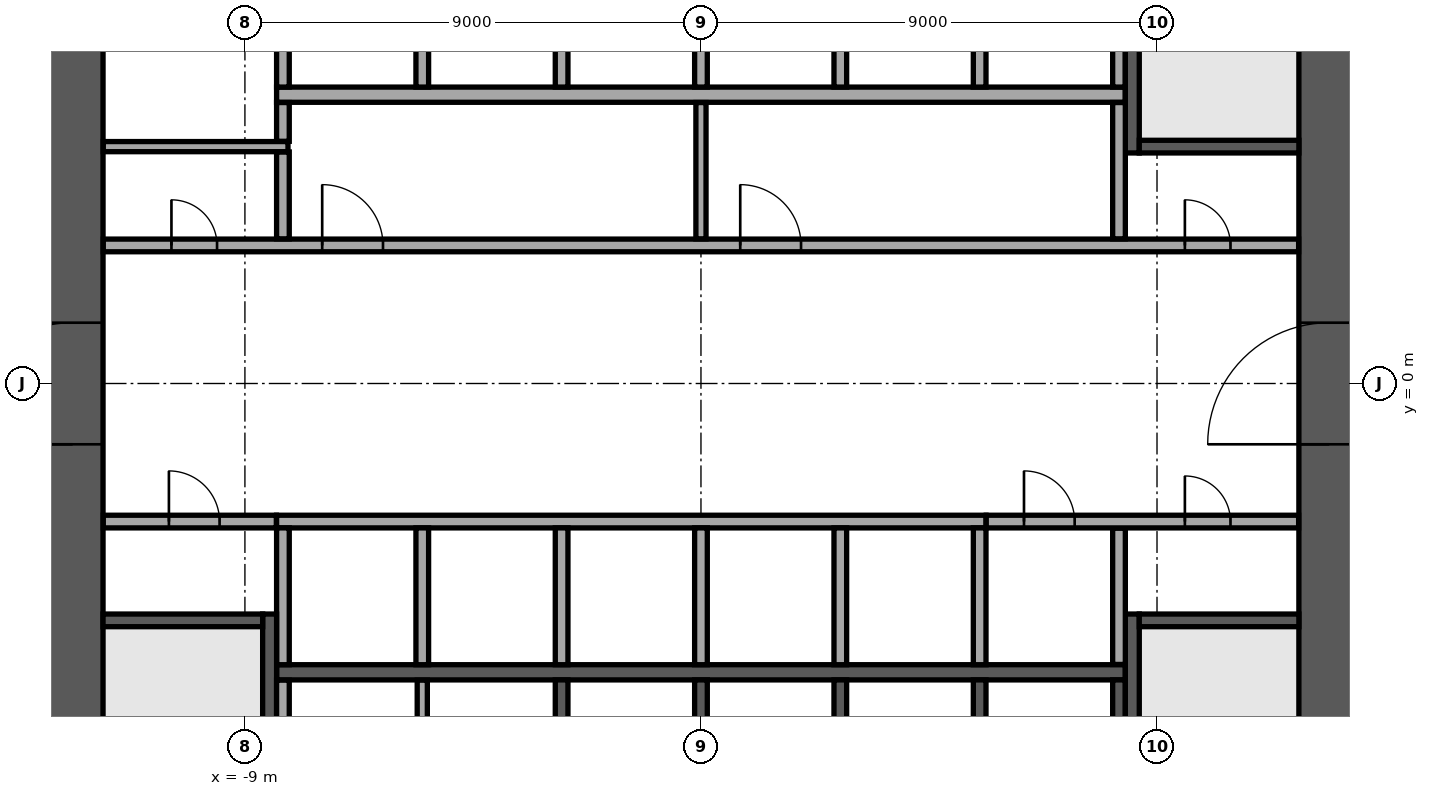
"""IFC4 building model, lengths in metres.
Left out: names, types, materials, properties, quantities, classifications, styles, units other than length and angle.
Written with IfcOpenShell. Run it as: python <this file> out.ifc"""

import sys

from ifc_helpers import new_model, si_unit, direction, frame, frame_2d, origin, place, context, subcontext, project, spatial, rectangle, extrude, element, fill, save


model = new_model("IFC4")
c1 = context("Model", 3, precision=1e-05, world=origin(), true_north=direction((0.0, 1.0)))
c2 = subcontext(c1, "Body", "Model", "MODEL_VIEW")
j1 = project(units=[si_unit("LENGTHUNIT", "METRE"), si_unit("PLANEANGLEUNIT", "RADIAN")], contexts=[c1])
p1 = place(None, origin())
s1 = spatial("IfcSite", under=j1, at=p1, CompositionType="ELEMENT")
p2 = place(p1, origin())
s2 = spatial("IfcBuilding", under=s1, at=p2, CompositionType="ELEMENT")
p3 = place(p2, frame((0.0, 0.0, 36.9)))
s3 = spatial("IfcBuildingStorey", under=s2, at=p3, CompositionType="ELEMENT", Elevation=36.9)
p4 = place(p3, frame((12.4, -11.8, 0.0), z_axis=(0.0, 0.0, 1.0), x_axis=(0.0, 1.0, 0.0)))
e1 = element("IfcWall", 1, at=p4, inside=s3, PredefinedType="SHEAR", context=c2, shape_type="SweptSolid", body=[
    extrude(rectangle(XDim=23.6, YDim=1.2, at=frame_2d((11.8, 0.0))), origin(), (0.0, 0.0, 1.0), 4.35),
])
p5 = place(p4, frame((10.6, 0.0, 0.0)))
e2 = element("IfcOpeningElement", 2, at=p5, cuts=e1, PredefinedType="OPENING", context=c2, shape_type="SweptSolid", body=[
    extrude(rectangle(XDim=2.4, YDim=2.4, at=frame_2d((1.2, 1.2))), frame((0.0, 0.61, 0.0), z_axis=(0.0, -1.0, 0.0), x_axis=(1.0, 0.0, 0.0)), (0.0, 0.0, 1.0), 1.22),
])
p6 = place(p3, frame((-12.4, -11.8, 0.0), z_axis=(0.0, 0.0, 1.0), x_axis=(0.0, 1.0, 0.0)))
e3 = element("IfcWall", 3, at=p6, inside=s3, PredefinedType="SHEAR", context=c2, shape_type="SweptSolid", body=[
    extrude(rectangle(XDim=23.6, YDim=1.2, at=frame_2d((11.8, 0.0))), origin(), (0.0, 0.0, 1.0), 4.35),
])
p7 = place(p6, frame((10.6, 0.0, 0.0)))
e4 = element("IfcOpeningElement", 4, at=p7, cuts=e3, PredefinedType="OPENING", context=c2, shape_type="SweptSolid", body=[
    extrude(rectangle(XDim=2.4, YDim=2.4, at=frame_2d((1.2, 1.2))), frame((0.0, 0.61, 0.0), z_axis=(0.0, -1.0, 0.0), x_axis=(1.0, 0.0, 0.0)), (0.0, 0.0, 1.0), 1.22),
])
for number, where, z_axis, x_axis in (
    (5, (-8.375, 5.7, 0.0), (0.0, 0.0, 1.0), (1.0, 0.0, 0.0)),
    (6, (-8.375, -5.7, 0.0), (0.0, 0.0, 1.0), (1.0, 0.0, 0.0)),
):
    element("IfcWall", number, at=place(p3, frame(where, z_axis=z_axis, x_axis=x_axis)), inside=s3, PredefinedType="SOLIDWALL", context=c2, shape_type="SweptSolid", body=[
        extrude(rectangle(XDim=16.75, YDim=0.3, at=frame_2d((8.375, 0.0))), origin(), (0.0, 0.0, 1.0), 4.35),
    ])
for number, where, z_axis, x_axis in (
    (7, (-8.25, 5.85, 0.0), (0.0, 0.0, 1.0), (0.0, 1.0, 0.0)),
    (8, (-5.5, 5.85, 0.0), (0.0, 0.0, 1.0), (0.0, 1.0, 0.0)),
    (9, (-2.75, 5.85, 0.0), (0.0, 0.0, 1.0), (0.0, 1.0, 0.0)),
    (10, (0.0, 5.85, 0.0), (0.0, 0.0, 1.0), (0.0, 1.0, 0.0)),
    (11, (2.75, 5.85, 0.0), (0.0, 0.0, 1.0), (0.0, 1.0, 0.0)),
    (12, (5.5, 5.85, 0.0), (0.0, 0.0, 1.0), (0.0, 1.0, 0.0)),
    (13, (8.25, 5.85, 0.0), (0.0, 0.0, 1.0), (0.0, 1.0, 0.0)),
):
    element("IfcWall", number, at=place(p3, frame(where, z_axis=z_axis, x_axis=x_axis)), inside=s3, PredefinedType="SOLIDWALL", context=c2, shape_type="SweptSolid", body=[
        extrude(rectangle(XDim=2.7, YDim=0.25, at=frame_2d((1.35, 0.0))), origin(), (0.0, 0.0, 1.0), 4.35),
    ])
p8 = place(p3, frame((-8.375, -2.725, 0.0), z_axis=(0.0, 0.0, 1.0), x_axis=(1.0, 0.0, 0.0)))
e14 = element("IfcWall", 14, at=p8, inside=s3, PredefinedType="SOLIDWALL", context=c2, shape_type="SweptSolid", body=[
    extrude(rectangle(XDim=14.0, YDim=0.25, at=frame_2d((7.0, 0.0))), origin(), (0.0, 0.0, 1.0), 4.35),
])
for number, where, z_axis, x_axis in (
    (15, (-8.25, -5.55, 0.0), (0.0, 0.0, 1.0), (0.0, 1.0, 0.0)),
    (16, (-5.5, -5.55, 0.0), (0.0, 0.0, 1.0), (0.0, 1.0, 0.0)),
    (17, (-2.75, -5.55, 0.0), (0.0, 0.0, 1.0), (0.0, 1.0, 0.0)),
    (18, (0.0, -5.55, 0.0), (0.0, 0.0, 1.0), (0.0, 1.0, 0.0)),
    (19, (2.75, -5.55, 0.0), (0.0, 0.0, 1.0), (0.0, 1.0, 0.0)),
    (20, (5.5, -5.55, 0.0), (0.0, 0.0, 1.0), (0.0, 1.0, 0.0)),
    (21, (-2.75, -8.55, 0.0), (0.0, 0.0, 1.0), (0.0, 1.0, 0.0)),
    (22, (0.0, -8.55, 0.0), (0.0, 0.0, 1.0), (0.0, 1.0, 0.0)),
    (23, (2.75, -8.55, 0.0), (0.0, 0.0, 1.0), (0.0, 1.0, 0.0)),
    (24, (5.5, -8.55, 0.0), (0.0, 0.0, 1.0), (0.0, 1.0, 0.0)),
    (25, (8.25, -8.55, 0.0), (0.0, 0.0, 1.0), (0.0, 1.0, 0.0)),
):
    element("IfcWall", number, at=place(p3, frame(where, z_axis=z_axis, x_axis=x_axis)), inside=s3, PredefinedType="SOLIDWALL", context=c2, shape_type="SweptSolid", body=[
        extrude(rectangle(XDim=2.7, YDim=0.25, at=frame_2d((1.35, 0.0))), origin(), (0.0, 0.0, 1.0), 4.35),
    ])
p9 = place(p3, frame((8.512, 4.55, 0.0), z_axis=(0.0, 0.0, 1.0), x_axis=(0.0, 1.0, 0.0)))
e26 = element("IfcWall", 26, at=p9, inside=s3, PredefinedType="SOLIDWALL", context=c2, shape_type="SweptSolid", body=[
    extrude(rectangle(XDim=7.25, YDim=0.275, at=frame_2d((3.625, 0.0))), origin(), (0.0, 0.0, 1.0), 4.35),
])
p10 = place(p9, frame((6.0, 0.0, 0.0)))
e27 = element("IfcOpeningElement", 27, at=p10, cuts=e26, PredefinedType="OPENING", context=c2, shape_type="SweptSolid", body=[
    extrude(rectangle(XDim=1.0, YDim=2.1, at=frame_2d((0.5, 1.05))), frame((0.0, 0.147, 0.0), z_axis=(0.0, -1.0, 0.0), x_axis=(1.0, 0.0, 0.0)), (0.0, 0.0, 1.0), 0.295),
])
p11 = place(p3, frame((8.65, 4.675, 0.0), z_axis=(0.0, 0.0, 1.0), x_axis=(1.0, 0.0, 0.0)))
e28 = element("IfcWall", 28, at=p11, inside=s3, PredefinedType="SOLIDWALL", context=c2, shape_type="SweptSolid", body=[
    extrude(rectangle(XDim=3.15, YDim=0.25, at=frame_2d((1.575, 0.0))), origin(), (0.0, 0.0, 1.0), 4.35),
])
p12 = place(p3, frame((-8.512, -4.55, 0.0), z_axis=(0.0, 0.0, 1.0), x_axis=(0.0, -1.0, 0.0)))
e29 = element("IfcWall", 29, at=p12, inside=s3, PredefinedType="SOLIDWALL", context=c2, shape_type="SweptSolid", body=[
    extrude(rectangle(XDim=7.25, YDim=0.275, at=frame_2d((3.625, 0.0))), origin(), (0.0, 0.0, 1.0), 4.35),
])
p13 = place(p12, frame((6.0, 0.0, 0.0)))
e30 = element("IfcOpeningElement", 30, at=p13, cuts=e29, PredefinedType="OPENING", context=c2, shape_type="SweptSolid", body=[
    extrude(rectangle(XDim=1.0, YDim=2.1, at=frame_2d((0.5, 1.05))), frame((0.0, 0.147, 0.0), z_axis=(0.0, -1.0, 0.0), x_axis=(1.0, 0.0, 0.0)), (0.0, 0.0, 1.0), 0.295),
])
p14 = place(p3, frame((-8.65, -4.675, 0.0), z_axis=(0.0, 0.0, 1.0), x_axis=(-1.0, 0.0, 0.0)))
e31 = element("IfcWall", 31, at=p14, inside=s3, PredefinedType="SOLIDWALL", context=c2, shape_type="SweptSolid", body=[
    extrude(rectangle(XDim=3.15, YDim=0.25, at=frame_2d((1.575, 0.0))), origin(), (0.0, 0.0, 1.0), 4.35),
])
p15 = place(p3, frame((8.512, -4.55, 0.0), z_axis=(0.0, 0.0, 1.0), x_axis=(0.0, -1.0, 0.0)))
e32 = element("IfcWall", 32, at=p15, inside=s3, PredefinedType="SOLIDWALL", context=c2, shape_type="SweptSolid", body=[
    extrude(rectangle(XDim=7.25, YDim=0.275, at=frame_2d((3.625, 0.0))), origin(), (0.0, 0.0, 1.0), 4.35),
])
p16 = place(p15, frame((6.0, 0.0, 0.0)))
e33 = element("IfcOpeningElement", 33, at=p16, cuts=e32, PredefinedType="OPENING", context=c2, shape_type="SweptSolid", body=[
    extrude(rectangle(XDim=1.0, YDim=2.1, at=frame_2d((0.5, 1.05))), frame((0.0, 0.147, 0.0), z_axis=(0.0, -1.0, 0.0), x_axis=(1.0, 0.0, 0.0)), (0.0, 0.0, 1.0), 0.295),
])
p17 = place(p3, frame((8.65, -4.675, 0.0), z_axis=(0.0, 0.0, 1.0), x_axis=(1.0, 0.0, 0.0)))
e34 = element("IfcWall", 34, at=p17, inside=s3, PredefinedType="SOLIDWALL", context=c2, shape_type="SweptSolid", body=[
    extrude(rectangle(XDim=3.15, YDim=0.25, at=frame_2d((1.575, 0.0))), origin(), (0.0, 0.0, 1.0), 4.35),
])
p18 = place(p3, frame((-8.25, -8.545, 0.0), z_axis=(0.0, 0.0, 1.0), x_axis=(0.0, 1.0, 0.0)))
e35 = element("IfcWall", 35, at=p18, inside=s3, PredefinedType="PARTITIONING", context=c2, shape_type="SweptSolid", body=[
    extrude(rectangle(XDim=2.69, YDim=0.25, at=frame_2d((1.345, 0.0))), origin(), (0.0, 0.0, 1.0), 4.35),
])
p19 = place(p3, frame((-5.5, -8.545, 0.0), z_axis=(0.0, 0.0, 1.0), x_axis=(0.0, 1.0, 0.0)))
e36 = element("IfcWall", 36, at=p19, inside=s3, PredefinedType="PARTITIONING", context=c2, shape_type="SweptSolid", body=[
    extrude(rectangle(XDim=2.69, YDim=0.2, at=frame_2d((1.345, 0.0))), origin(), (0.0, 0.0, 1.0), 4.35),
])
p20 = place(p3, frame((8.25, -5.545, 0.0), z_axis=(0.0, 0.0, 1.0), x_axis=(0.0, 1.0, 0.0)))
e37 = element("IfcWall", 37, at=p20, inside=s3, PredefinedType="PARTITIONING", context=c2, shape_type="SweptSolid", body=[
    extrude(rectangle(XDim=2.69, YDim=0.25, at=frame_2d((1.345, 0.0))), origin(), (0.0, 0.0, 1.0), 4.35),
])
p21 = place(p3, frame((-11.795, -2.725, 0.0), z_axis=(0.0, 0.0, 1.0), x_axis=(1.0, 0.0, 0.0)))
e38 = element("IfcWall", 38, at=p21, inside=s3, PredefinedType="PARTITIONING", context=c2, shape_type="SweptSolid", body=[
    extrude(rectangle(XDim=3.415, YDim=0.25, at=frame_2d((1.708, 0.0))), origin(), (0.0, 0.0, 1.0), 4.35),
])
p22 = place(p21, frame((1.295, 0.0, 0.0)))
e39 = element("IfcOpeningElement", 39, at=p22, cuts=e38, PredefinedType="OPENING", context=c2, shape_type="SweptSolid", body=[
    extrude(rectangle(XDim=1.0, YDim=2.1, at=frame_2d((0.5, 1.05))), frame((0.0, 0.135, 0.0), z_axis=(0.0, -1.0, 0.0), x_axis=(1.0, 0.0, 0.0)), (0.0, 0.0, 1.0), 0.27),
])
p23 = place(p3, frame((5.63, -2.725, 0.0), z_axis=(0.0, 0.0, 1.0), x_axis=(1.0, 0.0, 0.0)))
e40 = element("IfcWall", 40, at=p23, inside=s3, PredefinedType="PARTITIONING", context=c2, shape_type="SweptSolid", body=[
    extrude(rectangle(XDim=6.165, YDim=0.25, at=frame_2d((3.083, 0.0))), origin(), (0.0, 0.0, 1.0), 4.35),
])
p24 = place(p23, frame((0.745, 0.0, 0.0)))
e41 = element("IfcOpeningElement", 41, at=p24, cuts=e40, PredefinedType="OPENING", context=c2, shape_type="SweptSolid", body=[
    extrude(rectangle(XDim=1.0, YDim=2.1, at=frame_2d((0.5, 1.05))), frame((0.0, 0.135, 0.0), z_axis=(0.0, -1.0, 0.0), x_axis=(1.0, 0.0, 0.0)), (0.0, 0.0, 1.0), 0.27),
])
p25 = place(p23, frame((3.92, 0.0, 0.0)))
e42 = element("IfcOpeningElement", 42, at=p25, cuts=e40, PredefinedType="OPENING", context=c2, shape_type="SweptSolid", body=[
    extrude(rectangle(XDim=0.9, YDim=2.1, at=frame_2d((0.45, 1.05))), frame((0.0, 0.135, 0.0), z_axis=(0.0, -1.0, 0.0), x_axis=(1.0, 0.0, 0.0)), (0.0, 0.0, 1.0), 0.27),
])
p26 = place(p3, frame((-11.795, 2.725, 0.0), z_axis=(0.0, 0.0, 1.0), x_axis=(1.0, 0.0, 0.0)))
e43 = element("IfcWall", 43, at=p26, inside=s3, PredefinedType="PARTITIONING", context=c2, shape_type="SweptSolid", body=[
    extrude(rectangle(XDim=23.59, YDim=0.25, at=frame_2d((11.795, 0.0))), origin(), (0.0, 0.0, 1.0), 4.35),
])
p27 = place(p26, frame((21.345, 0.0, 0.0)))
e44 = element("IfcOpeningElement", 44, at=p27, cuts=e43, PredefinedType="OPENING", context=c2, shape_type="SweptSolid", body=[
    extrude(rectangle(XDim=0.9, YDim=2.1, at=frame_2d((0.45, 1.05))), frame((0.0, 0.135, 0.0), z_axis=(0.0, -1.0, 0.0), x_axis=(1.0, 0.0, 0.0)), (0.0, 0.0, 1.0), 0.27),
])
p28 = place(p26, frame((1.345, 0.0, 0.0)))
e45 = element("IfcOpeningElement", 45, at=p28, cuts=e43, PredefinedType="OPENING", context=c2, shape_type="SweptSolid", body=[
    extrude(rectangle(XDim=0.9, YDim=2.1, at=frame_2d((0.45, 1.05))), frame((0.0, 0.135, 0.0), z_axis=(0.0, -1.0, 0.0), x_axis=(1.0, 0.0, 0.0)), (0.0, 0.0, 1.0), 0.27),
])
p29 = place(p26, frame((4.32, 0.0, 0.0)))
e46 = element("IfcOpeningElement", 46, at=p29, cuts=e43, PredefinedType="OPENING", context=c2, shape_type="SweptSolid", body=[
    extrude(rectangle(XDim=1.2, YDim=2.1, at=frame_2d((0.6, 1.05))), frame((0.0, 0.135, 0.0), z_axis=(0.0, -1.0, 0.0), x_axis=(1.0, 0.0, 0.0)), (0.0, 0.0, 1.0), 0.27),
])
p30 = place(p26, frame((12.57, 0.0, 0.0)))
e47 = element("IfcOpeningElement", 47, at=p30, cuts=e43, PredefinedType="OPENING", context=c2, shape_type="SweptSolid", body=[
    extrude(rectangle(XDim=1.2, YDim=2.1, at=frame_2d((0.6, 1.05))), frame((0.0, 0.135, 0.0), z_axis=(0.0, -1.0, 0.0), x_axis=(1.0, 0.0, 0.0)), (0.0, 0.0, 1.0), 0.27),
])
p31 = place(p3, frame((-8.25, 2.855, 0.0), z_axis=(0.0, 0.0, 1.0), x_axis=(0.0, 1.0, 0.0)))
e48 = element("IfcWall", 48, at=p31, inside=s3, PredefinedType="PARTITIONING", context=c2, shape_type="SweptSolid", body=[
    extrude(rectangle(XDim=1.715, YDim=0.25, at=frame_2d((0.857, 0.0))), origin(), (0.0, 0.0, 1.0), 4.35),
])
p32 = place(p3, frame((0.0, 2.855, 0.0), z_axis=(0.0, 0.0, 1.0), x_axis=(0.0, 1.0, 0.0)))
e49 = element("IfcWall", 49, at=p32, inside=s3, PredefinedType="PARTITIONING", context=c2, shape_type="SweptSolid", body=[
    extrude(rectangle(XDim=2.69, YDim=0.2, at=frame_2d((1.345, 0.0))), origin(), (0.0, 0.0, 1.0), 4.35),
])
p33 = place(p3, frame((8.25, 2.855, 0.0), z_axis=(0.0, 0.0, 1.0), x_axis=(0.0, 1.0, 0.0)))
e50 = element("IfcWall", 50, at=p33, inside=s3, PredefinedType="PARTITIONING", context=c2, shape_type="SweptSolid", body=[
    extrude(rectangle(XDim=2.69, YDim=0.25, at=frame_2d((1.345, 0.0))), origin(), (0.0, 0.0, 1.0), 4.35),
])
p34 = place(p3, frame((-11.795, 4.675, 0.0), z_axis=(0.0, 0.0, 1.0), x_axis=(1.0, 0.0, 0.0)))
e51 = element("IfcWall", 51, at=p34, inside=s3, PredefinedType="PARTITIONING", context=c2, shape_type="SweptSolid", body=[
    extrude(rectangle(XDim=3.645, YDim=0.2, at=frame_2d((1.823, 0.0))), origin(), (0.0, 0.0, 1.0), 4.35),
])
p35 = place(p3, frame((-8.25, 4.78, 0.0), z_axis=(0.0, 0.0, 1.0), x_axis=(0.0, 1.0, 0.0)))
e52 = element("IfcWall", 52, at=p35, inside=s3, PredefinedType="PARTITIONING", context=c2, shape_type="SweptSolid", body=[
    extrude(rectangle(XDim=0.765, YDim=0.25, at=frame_2d((0.382, 0.0))), origin(), (0.0, 0.0, 1.0), 4.35),
])
p36 = place(p5, origin())
e53 = element("IfcDoor", 53, at=p36, inside=s3, OperationType="SINGLE_SWING_LEFT", PredefinedType="DOOR", context=c2, shape_type="SweptSolid", body=[
    extrude(rectangle(XDim=2.4, YDim=2.4, at=frame_2d((1.2, 1.2))), frame((0.0, 0.025, 0.0), z_axis=(0.0, -1.0, 0.0), x_axis=(1.0, 0.0, 0.0)), (0.0, 0.0, 1.0), 0.05),
])
fill(e2, e53)
p37 = place(p7, origin())
e54 = element("IfcDoor", 54, at=p37, inside=s3, OperationType="SINGLE_SWING_LEFT", PredefinedType="DOOR", context=c2, shape_type="SweptSolid", body=[
    extrude(rectangle(XDim=2.4, YDim=2.4, at=frame_2d((1.2, 1.2))), frame((0.0, 0.025, 0.0), z_axis=(0.0, -1.0, 0.0), x_axis=(1.0, 0.0, 0.0)), (0.0, 0.0, 1.0), 0.05),
])
fill(e4, e54)
p38 = place(p22, origin())
e55 = element("IfcDoor", 55, at=p38, inside=s3, OperationType="SINGLE_SWING_LEFT", PredefinedType="DOOR", context=c2, shape_type="SweptSolid", body=[
    extrude(rectangle(XDim=1.0, YDim=2.1, at=frame_2d((0.5, 1.05))), frame((0.0, 0.025, 0.0), z_axis=(0.0, -1.0, 0.0), x_axis=(1.0, 0.0, 0.0)), (0.0, 0.0, 1.0), 0.05),
])
fill(e39, e55)
p39 = place(p24, origin())
e56 = element("IfcDoor", 56, at=p39, inside=s3, OperationType="SINGLE_SWING_LEFT", PredefinedType="DOOR", context=c2, shape_type="SweptSolid", body=[
    extrude(rectangle(XDim=1.0, YDim=2.1, at=frame_2d((0.5, 1.05))), frame((0.0, 0.025, 0.0), z_axis=(0.0, -1.0, 0.0), x_axis=(1.0, 0.0, 0.0)), (0.0, 0.0, 1.0), 0.05),
])
fill(e41, e56)
p40 = place(p27, origin())
e57 = element("IfcDoor", 57, at=p40, inside=s3, OperationType="SINGLE_SWING_LEFT", PredefinedType="DOOR", context=c2, shape_type="SweptSolid", body=[
    extrude(rectangle(XDim=0.9, YDim=2.1, at=frame_2d((0.45, 1.05))), frame((0.0, 0.025, 0.0), z_axis=(0.0, -1.0, 0.0), x_axis=(1.0, 0.0, 0.0)), (0.0, 0.0, 1.0), 0.05),
])
fill(e44, e57)
p41 = place(p25, origin())
e58 = element("IfcDoor", 58, at=p41, inside=s3, OperationType="SINGLE_SWING_LEFT", PredefinedType="DOOR", context=c2, shape_type="SweptSolid", body=[
    extrude(rectangle(XDim=0.9, YDim=2.1, at=frame_2d((0.45, 1.05))), frame((0.0, 0.025, 0.0), z_axis=(0.0, -1.0, 0.0), x_axis=(1.0, 0.0, 0.0)), (0.0, 0.0, 1.0), 0.05),
])
fill(e42, e58)
p42 = place(p28, origin())
e59 = element("IfcDoor", 59, at=p42, inside=s3, OperationType="SINGLE_SWING_LEFT", PredefinedType="DOOR", context=c2, shape_type="SweptSolid", body=[
    extrude(rectangle(XDim=0.9, YDim=2.1, at=frame_2d((0.45, 1.05))), frame((0.0, 0.025, 0.0), z_axis=(0.0, -1.0, 0.0), x_axis=(1.0, 0.0, 0.0)), (0.0, 0.0, 1.0), 0.05),
])
fill(e45, e59)
p43 = place(p29, origin())
e60 = element("IfcDoor", 60, at=p43, inside=s3, OperationType="SINGLE_SWING_LEFT", PredefinedType="DOOR", context=c2, shape_type="SweptSolid", body=[
    extrude(rectangle(XDim=1.2, YDim=2.1, at=frame_2d((0.6, 1.05))), frame((0.0, 0.025, 0.0), z_axis=(0.0, -1.0, 0.0), x_axis=(1.0, 0.0, 0.0)), (0.0, 0.0, 1.0), 0.05),
])
fill(e46, e60)
p44 = place(p30, origin())
e61 = element("IfcDoor", 61, at=p44, inside=s3, OperationType="SINGLE_SWING_LEFT", PredefinedType="DOOR", context=c2, shape_type="SweptSolid", body=[
    extrude(rectangle(XDim=1.2, YDim=2.1, at=frame_2d((0.6, 1.05))), frame((0.0, 0.025, 0.0), z_axis=(0.0, -1.0, 0.0), x_axis=(1.0, 0.0, 0.0)), (0.0, 0.0, 1.0), 0.05),
])
fill(e47, e61)
save(model, sys.argv[1])
